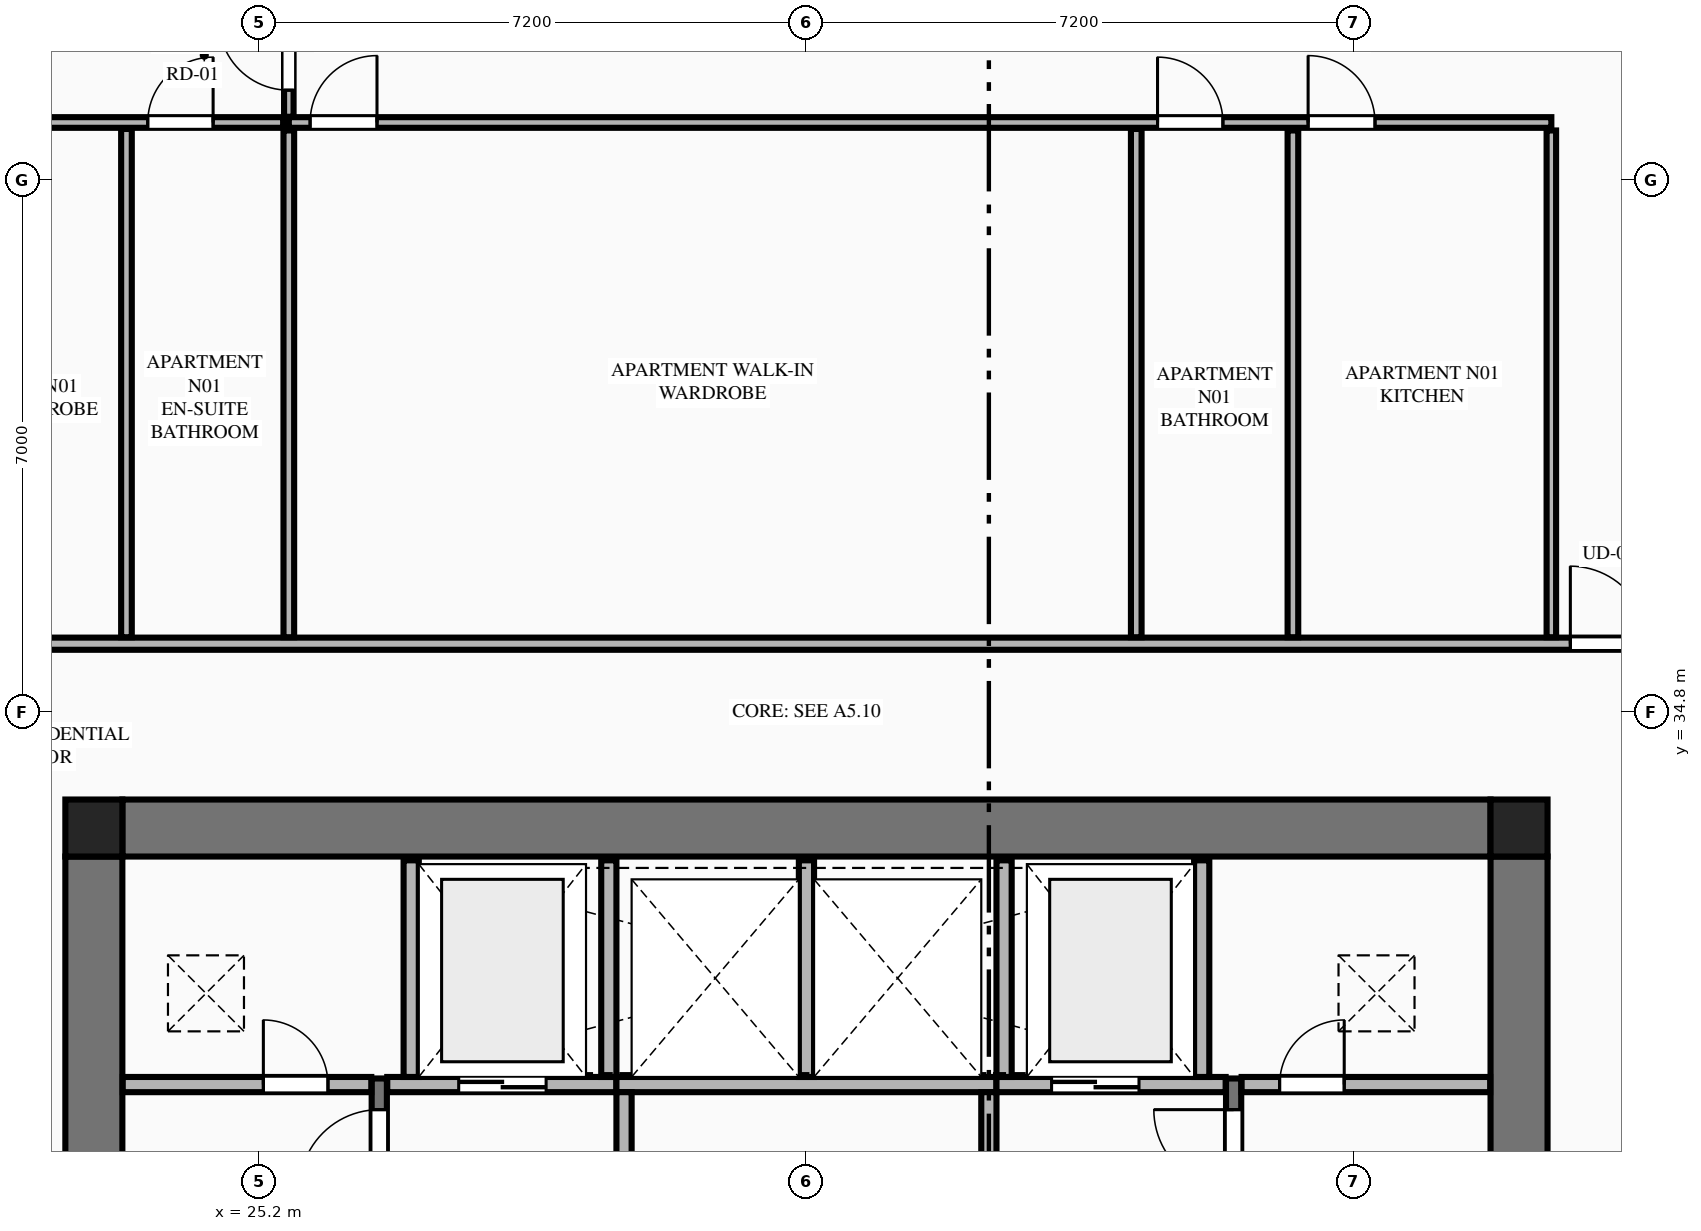
"""IFC4 building model, lengths in metres.
Left out: names, types, materials, properties, quantities, classifications, styles, units other than length and angle.
Written with IfcOpenShell. Run it as: python <this file> out.ifc"""

import sys

from ifc_helpers import new_model, si_unit, direction, frame, frame_2d, origin, origin_2d, place, context, subcontext, project, spatial, rectangle, extrude, element, fill, save


model = new_model("IFC4")
c1 = context("Model", 3, precision=1e-05, world=origin(), true_north=direction((0.0, 1.0)))
c2 = subcontext(c1, "Body", "Model", "MODEL_VIEW")
j1 = project(units=[si_unit("LENGTHUNIT", "METRE"), si_unit("PLANEANGLEUNIT", "RADIAN")], contexts=[c1])
p1 = place(None, origin())
s1 = spatial("IfcSite", under=j1, at=p1, CompositionType="ELEMENT")
p2 = place(p1, origin())
s2 = spatial("IfcBuilding", under=s1, at=p2, CompositionType="ELEMENT")
p3 = place(p2, frame((0.0, 0.0, 80.0)))
s3 = spatial("IfcBuildingStorey", under=s2, at=p3, CompositionType="ELEMENT", Elevation=80.0)
for number, where, z_axis, x_axis in (
    (1, (41.775, 33.275, 0.0), (0.0, 0.0, 1.0), (1.0, 0.0, 0.0)),
    (2, (23.025, 33.275, 0.0), (0.0, 0.0, 1.0), (1.0, 0.0, 0.0)),
):
    element("IfcColumn", number, at=place(p3, frame(where, z_axis=z_axis, x_axis=x_axis)), inside=s3, PredefinedType="COLUMN", context=c2, shape_type="SweptSolid", body=[
        extrude(rectangle(XDim=0.75, YDim=0.75, at=origin_2d()), origin(), (0.0, 0.0, 1.0), 3.55),
    ])
p4 = place(p3, frame((23.4, 33.275, 0.0), z_axis=(0.0, 0.0, 1.0), x_axis=(1.0, 0.0, 0.0)))
e3 = element("IfcWall", 3, at=p4, inside=s3, PredefinedType="SHEAR", context=c2, shape_type="SweptSolid", body=[
    extrude(rectangle(XDim=18.0, YDim=0.75, at=frame_2d((9.0, 0.0))), origin(), (0.0, 0.0, 1.0), 3.33),
])
p5 = place(p3, frame((23.025, 18.9, 0.0), z_axis=(0.0, 0.0, 1.0), x_axis=(0.0, 1.0, 0.0)))
e4 = element("IfcWall", 4, at=p5, inside=s3, PredefinedType="SHEAR", context=c2, shape_type="SweptSolid", body=[
    extrude(rectangle(XDim=14.0, YDim=0.75, at=frame_2d((7.0, 0.0))), origin(), (0.0, 0.0, 1.0), 3.33),
])
p6 = place(p5, frame((2.94, 0.0, 0.0)))
e5 = element("IfcOpeningElement", 5, at=p6, cuts=e4, PredefinedType="OPENING", context=c2, shape_type="SweptSolid", body=[
    extrude(rectangle(XDim=1.22, YDim=2.25, at=frame_2d((0.61, 1.125))), frame((0.0, 0.385, 0.0), z_axis=(0.0, -1.0, 0.0), x_axis=(1.0, 0.0, 0.0)), (0.0, 0.0, 1.0), 0.77),
])
p7 = place(p3, frame((41.775, 18.9, 0.0), z_axis=(0.0, 0.0, 1.0), x_axis=(0.0, 1.0, 0.0)))
e6 = element("IfcWall", 6, at=p7, inside=s3, PredefinedType="SHEAR", context=c2, shape_type="SweptSolid", body=[
    extrude(rectangle(XDim=14.0, YDim=0.75, at=frame_2d((7.0, 0.0))), origin(), (0.0, 0.0, 1.0), 3.33),
])
p8 = place(p7, frame((2.94, 0.0, 0.0)))
e7 = element("IfcOpeningElement", 7, at=p8, cuts=e6, PredefinedType="OPENING", context=c2, shape_type="SweptSolid", body=[
    extrude(rectangle(XDim=1.22, YDim=2.25, at=frame_2d((0.61, 1.125))), frame((0.0, 0.385, 0.0), z_axis=(0.0, -1.0, 0.0), x_axis=(1.0, 0.0, 0.0)), (0.0, 0.0, 1.0), 0.77),
])
p9 = place(p3, frame((26.78, 23.2, 0.0), z_axis=(0.0, 0.0, 1.0), x_axis=(0.0, 1.0, 0.0)))
e8 = element("IfcWall", 8, at=p9, inside=s3, PredefinedType="SHEAR", context=c2, shape_type="SweptSolid", body=[
    extrude(rectangle(XDim=6.78, YDim=0.2, at=frame_2d((3.39, 0.0))), origin(), (0.0, 0.0, 1.0), 3.55),
])
p10 = place(p9, frame((5.32, 0.0, 0.0)))
e9 = element("IfcOpeningElement", 9, at=p10, cuts=e8, PredefinedType="OPENING", context=c2, shape_type="SweptSolid", body=[
    extrude(rectangle(XDim=1.05, YDim=2.15, at=frame_2d((0.525, 1.075))), frame((0.0, 0.11, 0.0), z_axis=(0.0, -1.0, 0.0), x_axis=(1.0, 0.0, 0.0)), (0.0, 0.0, 1.0), 0.22),
])
p11 = place(p3, frame((38.02, 23.2, 0.0), z_axis=(0.0, 0.0, 1.0), x_axis=(0.0, 1.0, 0.0)))
e10 = element("IfcWall", 10, at=p11, inside=s3, PredefinedType="SHEAR", context=c2, shape_type="SweptSolid", body=[
    extrude(rectangle(XDim=6.78, YDim=0.2, at=frame_2d((3.39, 0.0))), origin(), (0.0, 0.0, 1.0), 3.55),
])
p12 = place(p11, frame((5.32, 0.0, 0.0)))
e11 = element("IfcOpeningElement", 11, at=p12, cuts=e10, PredefinedType="OPENING", context=c2, shape_type="SweptSolid", body=[
    extrude(rectangle(XDim=1.05, YDim=2.15, at=frame_2d((0.525, 1.075))), frame((0.0, 0.11, 0.0), z_axis=(0.0, -1.0, 0.0), x_axis=(1.0, 0.0, 0.0)), (0.0, 0.0, 1.0), 0.22),
])
p13 = place(p3, frame((23.405, 29.9, 0.0), z_axis=(0.0, 0.0, 1.0), x_axis=(1.0, 0.0, 0.0)))
e12 = element("IfcWall", 12, at=p13, inside=s3, PredefinedType="PLUMBINGWALL", context=c2, shape_type="SweptSolid", body=[
    extrude(rectangle(XDim=3.27, YDim=0.2, at=frame_2d((1.635, 0.0))), origin(), (0.0, 0.0, 1.0), 3.33),
])
p14 = place(p13, frame((1.85, 0.0, 0.0)))
e13 = element("IfcOpeningElement", 13, at=p14, cuts=e12, PredefinedType="OPENING", context=c2, shape_type="SweptSolid", body=[
    extrude(rectangle(XDim=0.85, YDim=2.05, at=frame_2d((0.425, 1.025))), frame((0.0, 0.11, 0.0), z_axis=(0.0, -1.0, 0.0), x_axis=(1.0, 0.0, 0.0)), (0.0, 0.0, 1.0), 0.22),
])
p15 = place(p3, frame((26.885, 29.9, 0.0), z_axis=(0.0, 0.0, 1.0), x_axis=(1.0, 0.0, 0.0)))
e14 = element("IfcWall", 14, at=p15, inside=s3, PredefinedType="PLUMBINGWALL", context=c2, shape_type="SweptSolid", body=[
    extrude(rectangle(XDim=3.015, YDim=0.2, at=frame_2d((1.507, 0.0))), origin(), (0.0, 0.0, 1.0), 3.33),
])
p16 = place(p15, frame((0.94, 0.0, 0.0)))
e15 = element("IfcOpeningElement", 15, at=p16, cuts=e14, PredefinedType="OPENING", context=c2, shape_type="SweptSolid", body=[
    extrude(rectangle(XDim=1.15, YDim=2.2, at=frame_2d((0.575, 1.1))), frame((0.0, 0.11, 0.0), z_axis=(0.0, -1.0, 0.0), x_axis=(1.0, 0.0, 0.0)), (0.0, 0.0, 1.0), 0.22),
])
p17 = place(p3, frame((29.9, 29.9, 0.0), z_axis=(0.0, 0.0, 1.0), x_axis=(1.0, 0.0, 0.0)))
e16 = element("IfcWall", 16, at=p17, inside=s3, PredefinedType="PLUMBINGWALL", context=c2, shape_type="SweptSolid", body=[
    extrude(rectangle(XDim=5.0, YDim=0.2, at=frame_2d((2.5, 0.0))), origin(), (0.0, 0.0, 1.0), 3.33),
])
p18 = place(p3, frame((34.9, 29.9, 0.0), z_axis=(0.0, 0.0, 1.0), x_axis=(1.0, 0.0, 0.0)))
e17 = element("IfcWall", 17, at=p18, inside=s3, PredefinedType="PLUMBINGWALL", context=c2, shape_type="SweptSolid", body=[
    extrude(rectangle(XDim=3.015, YDim=0.2, at=frame_2d((1.508, 0.0))), origin(), (0.0, 0.0, 1.0), 3.33),
])
p19 = place(p18, frame((0.725, 0.0, 0.0)))
e18 = element("IfcOpeningElement", 18, at=p19, cuts=e17, PredefinedType="OPENING", context=c2, shape_type="SweptSolid", body=[
    extrude(rectangle(XDim=1.15, YDim=2.2, at=frame_2d((0.575, 1.1))), frame((0.0, 0.11, 0.0), z_axis=(0.0, -1.0, 0.0), x_axis=(1.0, 0.0, 0.0)), (0.0, 0.0, 1.0), 0.22),
])
p20 = place(p3, frame((38.125, 29.9, 0.0), z_axis=(0.0, 0.0, 1.0), x_axis=(1.0, 0.0, 0.0)))
e19 = element("IfcWall", 19, at=p20, inside=s3, PredefinedType="PLUMBINGWALL", context=c2, shape_type="SweptSolid", body=[
    extrude(rectangle(XDim=3.27, YDim=0.2, at=frame_2d((1.635, 0.0))), origin(), (0.0, 0.0, 1.0), 3.33),
])
p21 = place(p20, frame((0.5, 0.0, 0.0)))
e20 = element("IfcOpeningElement", 20, at=p21, cuts=e19, PredefinedType="OPENING", context=c2, shape_type="SweptSolid", body=[
    extrude(rectangle(XDim=0.85, YDim=2.05, at=frame_2d((0.425, 1.025))), frame((0.0, 0.11, 0.0), z_axis=(0.0, -1.0, 0.0), x_axis=(1.0, 0.0, 0.0)), (0.0, 0.0, 1.0), 0.22),
])
for number, where, z_axis, x_axis in (
    (21, (27.2, 30.0, 0.0), (0.0, 0.0, 1.0), (0.0, 1.0, 0.0)),
    (22, (29.8, 30.0, 0.0), (0.0, 0.0, 1.0), (0.0, 1.0, 0.0)),
    (23, (32.4, 30.0, 0.0), (0.0, 0.0, 1.0), (0.0, 1.0, 0.0)),
    (24, (35.0, 30.0, 0.0), (0.0, 0.0, 1.0), (0.0, 1.0, 0.0)),
    (25, (37.6, 30.0, 0.0), (0.0, 0.0, 1.0), (0.0, 1.0, 0.0)),
):
    element("IfcWall", number, at=place(p3, frame(where, z_axis=z_axis, x_axis=x_axis)), inside=s3, PredefinedType="PLUMBINGWALL", context=c2, shape_type="SweptSolid", body=[
        extrude(rectangle(XDim=2.85, YDim=0.2, at=frame_2d((1.425, 0.0))), origin(), (0.0, 0.0, 1.0), 3.33),
    ])
p22 = place(p3, frame((30.0, 27.05, 0.0), z_axis=(0.0, 0.0, 1.0), x_axis=(0.0, 1.0, 0.0)))
e26 = element("IfcWall", 26, at=p22, inside=s3, PredefinedType="PLUMBINGWALL", context=c2, shape_type="SweptSolid", body=[
    extrude(rectangle(XDim=2.75, YDim=0.2, at=frame_2d((1.375, 0.0))), origin(), (0.0, 0.0, 1.0), 3.33),
])
p23 = place(p22, frame((0.85, 0.0, 0.0)))
e27 = element("IfcOpeningElement", 27, at=p23, cuts=e26, PredefinedType="OPENING", context=c2, shape_type="SweptSolid", body=[
    extrude(rectangle(XDim=1.0, YDim=2.15, at=frame_2d((0.5, 1.075))), frame((0.0, 0.11, 0.0), z_axis=(0.0, -1.0, 0.0), x_axis=(1.0, 0.0, 0.0)), (0.0, 0.0, 1.0), 0.22),
])
p24 = place(p3, frame((34.8, 27.05, 0.0), z_axis=(0.0, 0.0, 1.0), x_axis=(0.0, 1.0, 0.0)))
e28 = element("IfcWall", 28, at=p24, inside=s3, PredefinedType="PLUMBINGWALL", context=c2, shape_type="SweptSolid", body=[
    extrude(rectangle(XDim=2.75, YDim=0.2, at=frame_2d((1.375, 0.0))), origin(), (0.0, 0.0, 1.0), 3.33),
])
p25 = place(p24, frame((0.85, 0.0, 0.0)))
e29 = element("IfcOpeningElement", 29, at=p25, cuts=e28, PredefinedType="OPENING", context=c2, shape_type="SweptSolid", body=[
    extrude(rectangle(XDim=1.0, YDim=2.15, at=frame_2d((0.5, 1.075))), frame((0.0, 0.11, 0.0), z_axis=(0.0, -1.0, 0.0), x_axis=(1.0, 0.0, 0.0)), (0.0, 0.0, 1.0), 0.22),
])
p26 = place(p3, frame((20.145, 35.7, 0.0), z_axis=(0.0, 0.0, 1.0), x_axis=(1.0, 0.0, 0.0)))
e30 = element("IfcWall", 30, at=p26, inside=s3, PredefinedType="PARTITIONING", context=c2, shape_type="SweptSolid", body=[
    extrude(rectangle(XDim=24.51, YDim=0.16, at=frame_2d((12.255, 0.0))), origin(), (0.0, 0.0, 1.0), 3.33),
])
p27 = place(p26, frame((22.305, 0.0, 0.0)))
e31 = element("IfcOpeningElement", 31, at=p27, cuts=e30, PredefinedType="OPENING", context=c2, shape_type="SweptSolid", body=[
    extrude(rectangle(XDim=1.02, YDim=2.25, at=frame_2d((0.51, 1.125))), frame((0.0, 0.09, 0.0), z_axis=(0.0, -1.0, 0.0), x_axis=(1.0, 0.0, 0.0)), (0.0, 0.0, 1.0), 0.18),
])
p28 = place(p3, frame((42.2, 35.785, 0.0), z_axis=(0.0, 0.0, 1.0), x_axis=(0.0, 1.0, 0.0)))
e32 = element("IfcWall", 32, at=p28, inside=s3, PredefinedType="PARTITIONING", context=c2, shape_type="SweptSolid", body=[
    extrude(rectangle(XDim=6.667, YDim=0.125, at=frame_2d((3.333, 0.0))), origin(), (0.0, 0.0, 1.0), 2.7),
])
p29 = place(p3, frame((25.59, 42.557, 0.0), z_axis=(0.0, 0.0, 1.0), x_axis=(1.0, 0.0, 0.0)))
e33 = element("IfcWall", 33, at=p29, inside=s3, PredefinedType="PLUMBINGWALL", context=c2, shape_type="SweptSolid", body=[
    extrude(rectangle(XDim=16.61, YDim=0.14, at=frame_2d((8.305, 0.0))), origin(), (0.0, 0.0, 1.0), 3.33),
])
p30 = place(p29, frame((0.28, 0.0, 0.0)))
e34 = element("IfcOpeningElement", 34, at=p30, cuts=e33, PredefinedType="OPENING", context=c2, shape_type="SweptSolid", body=[
    extrude(rectangle(XDim=0.88, YDim=2.15, at=frame_2d((0.44, 1.075))), frame((0.0, 0.08, 0.0), z_axis=(0.0, -1.0, 0.0), x_axis=(1.0, 0.0, 0.0)), (0.0, 0.0, 1.0), 0.16),
])
p31 = place(p29, frame((11.429, 0.0, 0.0)))
e35 = element("IfcOpeningElement", 35, at=p31, cuts=e33, PredefinedType="OPENING", context=c2, shape_type="SweptSolid", body=[
    extrude(rectangle(XDim=0.86, YDim=2.1, at=frame_2d((0.43, 1.05))), frame((0.0, 0.08, 0.0), z_axis=(0.0, -1.0, 0.0), x_axis=(1.0, 0.0, 0.0)), (0.0, 0.0, 1.0), 0.16),
])
p32 = place(p29, frame((13.41, 0.0, 0.0)))
e36 = element("IfcOpeningElement", 36, at=p32, cuts=e33, PredefinedType="OPENING", context=c2, shape_type="SweptSolid", body=[
    extrude(rectangle(XDim=0.88, YDim=2.15, at=frame_2d((0.44, 1.075))), frame((0.0, 0.08, 0.0), z_axis=(0.0, -1.0, 0.0), x_axis=(1.0, 0.0, 0.0)), (0.0, 0.0, 1.0), 0.16),
])
p33 = place(p3, frame((20.145, 42.557, 0.0), z_axis=(0.0, 0.0, 1.0), x_axis=(1.0, 0.0, 0.0)))
e37 = element("IfcWall", 37, at=p33, inside=s3, PredefinedType="PLUMBINGWALL", context=c2, shape_type="SweptSolid", body=[
    extrude(rectangle(XDim=5.37, YDim=0.14, at=frame_2d((2.685, 0.0))), origin(), (0.0, 0.0, 1.0), 3.33),
])
p34 = place(p33, frame((0.28, 0.0, 0.0)))
e38 = element("IfcOpeningElement", 38, at=p34, cuts=e37, PredefinedType="OPENING", context=c2, shape_type="SweptSolid", body=[
    extrude(rectangle(XDim=0.88, YDim=2.15, at=frame_2d((0.44, 1.075))), frame((0.0, 0.08, 0.0), z_axis=(0.0, -1.0, 0.0), x_axis=(1.0, 0.0, 0.0)), (0.0, 0.0, 1.0), 0.16),
])
p35 = place(p33, frame((3.589, 0.0, 0.0)))
e39 = element("IfcOpeningElement", 39, at=p35, cuts=e37, PredefinedType="OPENING", context=c2, shape_type="SweptSolid", body=[
    extrude(rectangle(XDim=0.86, YDim=2.1, at=frame_2d((0.43, 1.05))), frame((0.0, 0.08, 0.0), z_axis=(0.0, -1.0, 0.0), x_axis=(1.0, 0.0, 0.0)), (0.0, 0.0, 1.0), 0.16),
])
for number, where, z_axis, x_axis in (
    (40, (38.8, 35.785, 0.0), (0.0, 0.0, 1.0), (0.0, 1.0, 0.0)),
    (41, (25.59, 35.785, 0.0), (0.0, 0.0, 1.0), (0.0, 1.0, 0.0)),
):
    element("IfcWall", number, at=place(p3, frame(where, z_axis=z_axis, x_axis=x_axis)), inside=s3, PredefinedType="PLUMBINGWALL", context=c2, shape_type="SweptSolid", body=[
        extrude(rectangle(XDim=6.667, YDim=0.14, at=frame_2d((3.333, 0.0))), origin(), (0.0, 0.0, 1.0), 3.33),
    ])
p36 = place(p3, frame((25.59, 42.632, 0.0), z_axis=(0.0, 0.0, 1.0), x_axis=(0.0, 1.0, 0.0)))
e42 = element("IfcWall", 42, at=p36, inside=s3, PredefinedType="PARTITIONING", context=c2, shape_type="SweptSolid", body=[
    extrude(rectangle(XDim=6.603, YDim=0.125, at=frame_2d((3.302, 0.0))), origin(), (0.0, 0.0, 1.0), 3.33),
])
p37 = place(p36, frame((0.35, 0.0, 0.0)))
e43 = element("IfcOpeningElement", 43, at=p37, cuts=e42, PredefinedType="OPENING", context=c2, shape_type="SweptSolid", body=[
    extrude(rectangle(XDim=0.92, YDim=2.15, at=frame_2d((0.46, 1.075))), frame((0.0, 0.073, 0.0), z_axis=(0.0, -1.0, 0.0), x_axis=(1.0, 0.0, 0.0)), (0.0, 0.0, 1.0), 0.145),
])
for number, where, z_axis, x_axis in (
    (44, (36.739, 35.785, 0.0), (0.0, 0.0, 1.0), (0.0, 1.0, 0.0)),
    (45, (23.454, 35.785, 0.0), (0.0, 0.0, 1.0), (0.0, 1.0, 0.0)),
):
    element("IfcWall", number, at=place(p3, frame(where, z_axis=z_axis, x_axis=x_axis)), inside=s3, PredefinedType="PLUMBINGWALL", context=c2, shape_type="SweptSolid", body=[
        extrude(rectangle(XDim=6.687, YDim=0.14, at=frame_2d((3.344, 0.0))), origin(), (0.0, 0.0, 1.0), 3.33),
    ])
p38 = place(p10, origin())
e46 = element("IfcDoor", 46, at=p38, inside=s3, OperationType="SINGLE_SWING_LEFT", PredefinedType="DOOR", context=c2, shape_type="SweptSolid", body=[
    extrude(rectangle(XDim=1.05, YDim=2.15, at=frame_2d((0.525, 1.075))), frame((0.0, 0.025, 0.0), z_axis=(0.0, -1.0, 0.0), x_axis=(1.0, 0.0, 0.0)), (0.0, 0.0, 1.0), 0.05),
])
fill(e9, e46)
p39 = place(p12, origin())
e47 = element("IfcDoor", 47, at=p39, inside=s3, OperationType="SINGLE_SWING_RIGHT", PredefinedType="DOOR", context=c2, shape_type="SweptSolid", body=[
    extrude(rectangle(XDim=1.05, YDim=2.15, at=frame_2d((0.525, 1.075))), frame((0.0, 0.025, 0.0), z_axis=(0.0, -1.0, 0.0), x_axis=(1.0, 0.0, 0.0)), (0.0, 0.0, 1.0), 0.05),
])
fill(e11, e47)
p40 = place(p14, origin())
e48 = element("IfcDoor", 48, at=p40, inside=s3, OperationType="SINGLE_SWING_LEFT", PredefinedType="DOOR", context=c2, shape_type="SweptSolid", body=[
    extrude(rectangle(XDim=0.85, YDim=2.05, at=frame_2d((0.425, 1.025))), frame((0.0, 0.025, 0.0), z_axis=(0.0, -1.0, 0.0), x_axis=(1.0, 0.0, 0.0)), (0.0, 0.0, 1.0), 0.05),
])
fill(e13, e48)
p41 = place(p21, origin())
e49 = element("IfcDoor", 49, at=p41, inside=s3, OperationType="SINGLE_SWING_RIGHT", PredefinedType="DOOR", context=c2, shape_type="SweptSolid", body=[
    extrude(rectangle(XDim=0.85, YDim=2.05, at=frame_2d((0.425, 1.025))), frame((0.0, 0.025, 0.0), z_axis=(0.0, -1.0, 0.0), x_axis=(1.0, 0.0, 0.0)), (0.0, 0.0, 1.0), 0.05),
])
fill(e20, e49)
p42 = place(p16, origin())
e50 = element("IfcDoor", 50, at=p42, inside=s3, OperationType="DOUBLE_DOOR_SLIDING", PredefinedType="DOOR", context=c2, shape_type="SweptSolid", body=[
    extrude(rectangle(XDim=1.15, YDim=2.2, at=frame_2d((0.575, 1.1))), frame((0.0, 0.025, 0.0), z_axis=(0.0, -1.0, 0.0), x_axis=(1.0, 0.0, 0.0)), (0.0, 0.0, 1.0), 0.05),
])
fill(e15, e50)
p43 = place(p19, origin())
e51 = element("IfcDoor", 51, at=p43, inside=s3, OperationType="DOUBLE_DOOR_SLIDING", PredefinedType="DOOR", context=c2, shape_type="SweptSolid", body=[
    extrude(rectangle(XDim=1.15, YDim=2.2, at=frame_2d((0.575, 1.1))), frame((0.0, 0.025, 0.0), z_axis=(0.0, -1.0, 0.0), x_axis=(1.0, 0.0, 0.0)), (0.0, 0.0, 1.0), 0.05),
])
fill(e18, e51)
p44 = place(p30, origin())
e52 = element("IfcDoor", 52, at=p44, inside=s3, OperationType="SINGLE_SWING_RIGHT", PredefinedType="DOOR", context=c2, shape_type="SweptSolid", body=[
    extrude(rectangle(XDim=0.88, YDim=2.15, at=frame_2d((0.44, 1.075))), frame((0.0, 0.025, 0.0), z_axis=(0.0, -1.0, 0.0), x_axis=(1.0, 0.0, 0.0)), (0.0, 0.0, 1.0), 0.05),
])
fill(e34, e52)
p45 = place(p31, origin())
e53 = element("IfcDoor", 53, at=p45, inside=s3, OperationType="SINGLE_SWING_LEFT", PredefinedType="DOOR", context=c2, shape_type="SweptSolid", body=[
    extrude(rectangle(XDim=0.86, YDim=2.1, at=frame_2d((0.43, 1.05))), frame((0.0, 0.025, 0.0), z_axis=(0.0, -1.0, 0.0), x_axis=(1.0, 0.0, 0.0)), (0.0, 0.0, 1.0), 0.05),
])
fill(e35, e53)
p46 = place(p35, origin())
e54 = element("IfcDoor", 54, at=p46, inside=s3, OperationType="SINGLE_SWING_RIGHT", PredefinedType="DOOR", context=c2, shape_type="SweptSolid", body=[
    extrude(rectangle(XDim=0.86, YDim=2.1, at=frame_2d((0.43, 1.05))), frame((0.0, 0.025, 0.0), z_axis=(0.0, -1.0, 0.0), x_axis=(1.0, 0.0, 0.0)), (0.0, 0.0, 1.0), 0.05),
])
fill(e39, e54)
p47 = place(p27, origin())
e55 = element("IfcDoor", 55, at=p47, inside=s3, OperationType="SINGLE_SWING_LEFT", PredefinedType="DOOR", context=c2, shape_type="SweptSolid", body=[
    extrude(rectangle(XDim=1.02, YDim=2.25, at=frame_2d((0.51, 1.125))), frame((0.0, 0.025, 0.0), z_axis=(0.0, -1.0, 0.0), x_axis=(1.0, 0.0, 0.0)), (0.0, 0.0, 1.0), 0.05),
])
fill(e31, e55)
p48 = place(p32, origin())
e56 = element("IfcDoor", 56, at=p48, inside=s3, OperationType="SINGLE_SWING_LEFT", PredefinedType="DOOR", context=c2, shape_type="SweptSolid", body=[
    extrude(rectangle(XDim=0.88, YDim=2.15, at=frame_2d((0.44, 1.075))), frame((0.0, 0.025, 0.0), z_axis=(0.0, -1.0, 0.0), x_axis=(1.0, 0.0, 0.0)), (0.0, 0.0, 1.0), 0.05),
])
fill(e36, e56)
p49 = place(p37, origin())
e57 = element("IfcDoor", 57, at=p49, inside=s3, OperationType="SINGLE_SWING_RIGHT", PredefinedType="DOOR", context=c2, shape_type="SweptSolid", body=[
    extrude(rectangle(XDim=0.92, YDim=2.15, at=frame_2d((0.46, 1.075))), frame((0.0, 0.025, 0.0), z_axis=(0.0, -1.0, 0.0), x_axis=(1.0, 0.0, 0.0)), (0.0, 0.0, 1.0), 0.05),
])
fill(e43, e57)
save(model, sys.argv[1])
